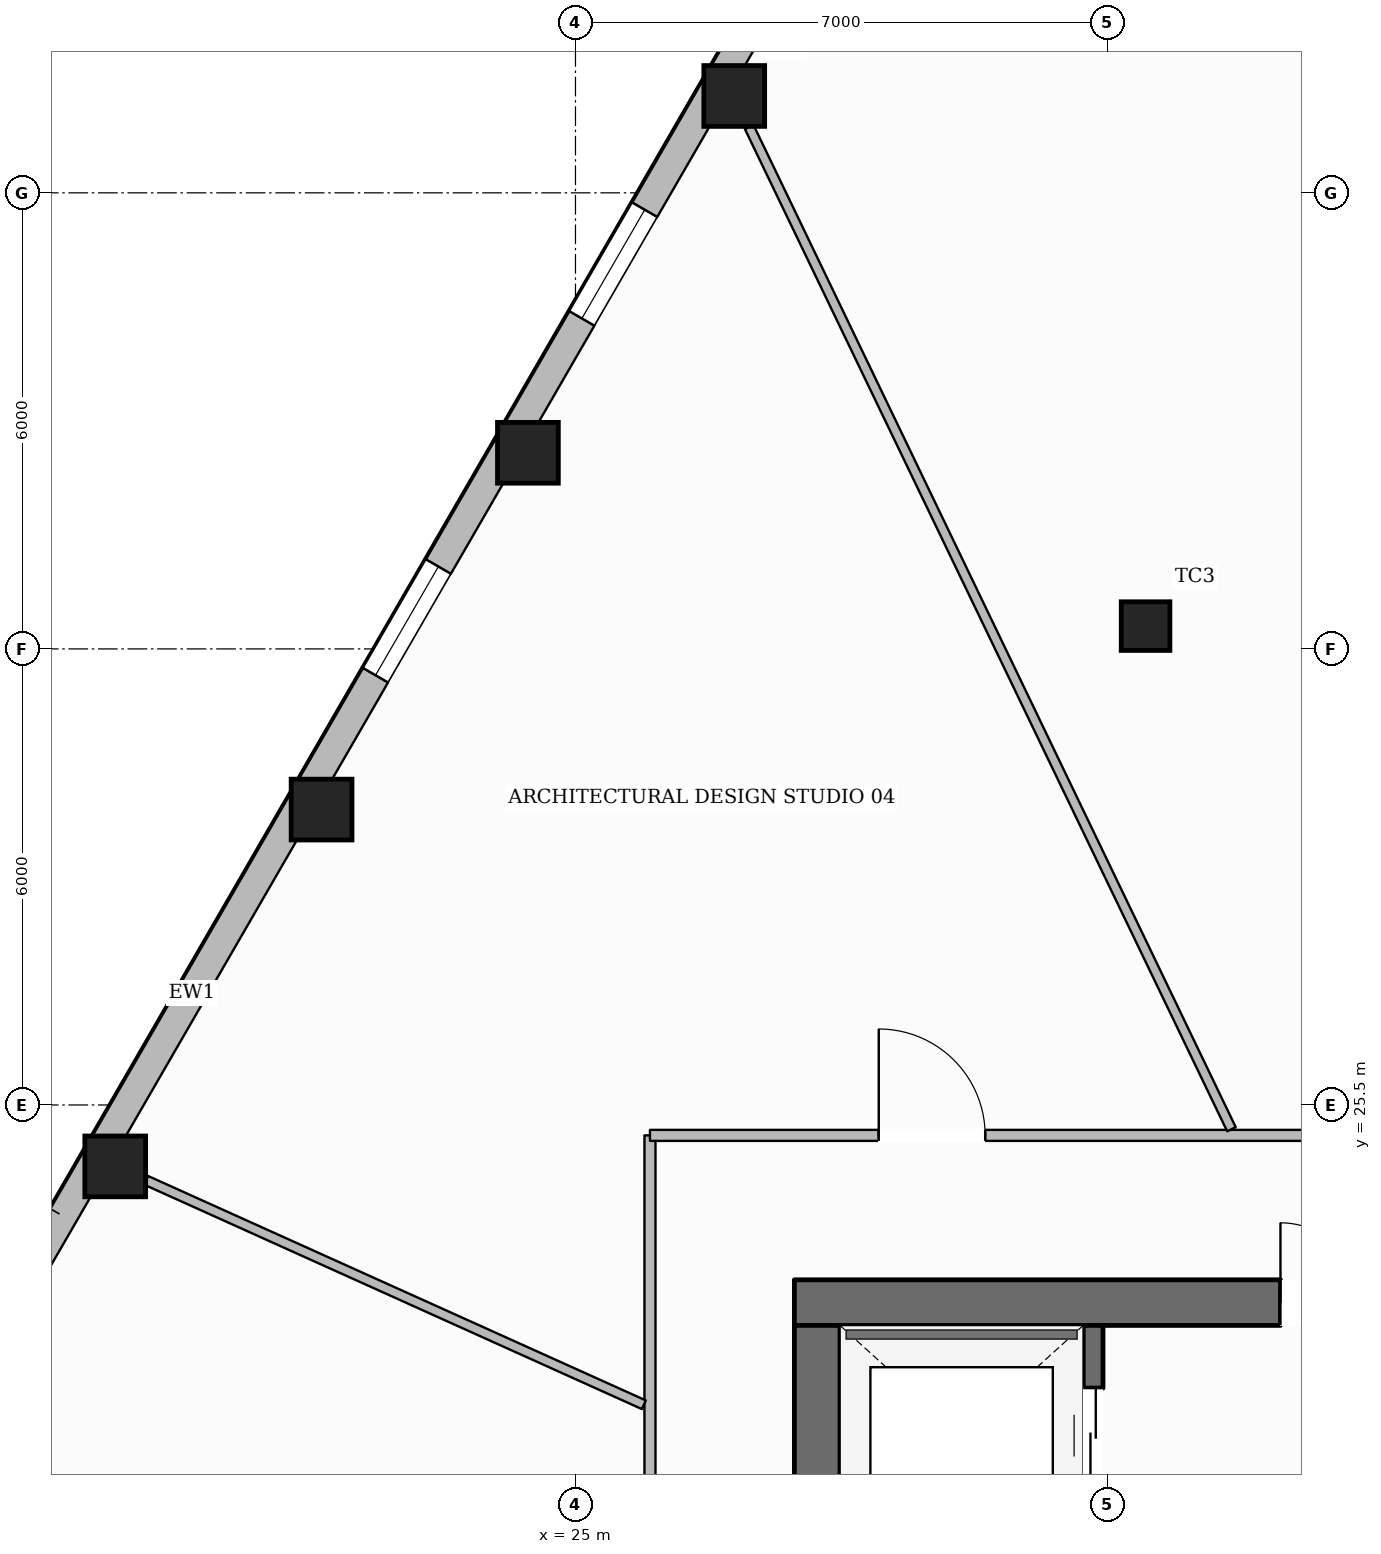
"""IFC4 building model, lengths in metres.
Left out: names, types, materials, properties, quantities, classifications, styles, units other than length and angle.
Written with IfcOpenShell. Run it as: python <this file> out.ifc"""

import sys

from ifc_helpers import new_model, si_unit, direction, frame, frame_2d, origin, origin_2d, place, context, subcontext, project, spatial, rectangle, hollow_rectangle, extrude, element, fill, save


model = new_model("IFC4")
c1 = context("Model", 3, precision=1e-05, world=origin(), true_north=direction((0.0, 1.0)))
c2 = subcontext(c1, "Body", "Model", "MODEL_VIEW")
j1 = project(units=[si_unit("LENGTHUNIT", "METRE"), si_unit("PLANEANGLEUNIT", "RADIAN")], contexts=[c1])
p1 = place(None, origin())
s1 = spatial("IfcSite", under=j1, at=p1, CompositionType="ELEMENT")
p2 = place(p1, origin())
s2 = spatial("IfcBuilding", under=s1, at=p2, CompositionType="ELEMENT")
p3 = place(p2, frame((0.0, 0.0, 9.85)))
s3 = spatial("IfcBuildingStorey", under=s2, at=p3, CompositionType="ELEMENT", Elevation=9.85)
p4 = place(p3, frame((27.88, 22.9, 0.0), z_axis=(0.0, 0.0, 1.0), x_axis=(1.0, 0.0, 0.0)))
e1 = element("IfcWall", 1, at=p4, inside=s3, PredefinedType="SOLIDWALL", context=c2, shape_type="SweptSolid", body=[
    extrude(rectangle(XDim=20.24, YDim=0.6, at=frame_2d((10.12, 0.0))), origin(), (0.0, 0.0, 1.0), 3.59),
])
p5 = place(p4, frame((6.395, 0.0, 0.0)))
e2 = element("IfcOpeningElement", 2, at=p5, cuts=e1, PredefinedType="OPENING", context=c2, shape_type="SweptSolid", body=[
    extrude(rectangle(XDim=1.05, YDim=2.15, at=frame_2d((0.525, 1.075))), frame((0.0, 0.31, 0.0), z_axis=(0.0, -1.0, 0.0), x_axis=(1.0, 0.0, 0.0)), (0.0, 0.0, 1.0), 0.62),
])
p6 = place(p4, frame((12.795, 0.0, 0.0)))
e3 = element("IfcOpeningElement", 3, at=p6, cuts=e1, PredefinedType="OPENING", context=c2, shape_type="SweptSolid", body=[
    extrude(rectangle(XDim=1.05, YDim=2.15, at=frame_2d((0.525, 1.075))), frame((0.0, 0.31, 0.0), z_axis=(0.0, -1.0, 0.0), x_axis=(1.0, 0.0, 0.0)), (0.0, 0.0, 1.0), 0.62),
])
p7 = place(p3, frame((28.18, 9.6, 0.0), z_axis=(0.0, 0.0, 1.0), x_axis=(0.0, 1.0, 0.0)))
e4 = element("IfcWall", 4, at=p7, inside=s3, PredefinedType="SOLIDWALL", context=c2, shape_type="SweptSolid", body=[
    extrude(rectangle(XDim=13.0, YDim=0.6, at=frame_2d((6.5, 0.0))), origin(), (0.0, 0.0, 1.0), 3.59),
])
p8 = place(p7, frame((0.2, 0.0, 0.0)))
e5 = element("IfcOpeningElement", 5, at=p8, cuts=e4, PredefinedType="OPENING", context=c2, shape_type="SweptSolid", body=[
    extrude(rectangle(XDim=1.1, YDim=2.15, at=frame_2d((0.55, 1.075))), frame((0.0, 0.31, 0.0), z_axis=(0.0, -1.0, 0.0), x_axis=(1.0, 0.0, 0.0)), (0.0, 0.0, 1.0), 0.62),
])
p9 = place(p7, frame((8.4, 0.0, 0.0)))
e6 = element("IfcOpeningElement", 6, at=p9, cuts=e4, PredefinedType="OPENING", context=c2, shape_type="SweptSolid", body=[
    extrude(rectangle(XDim=0.9, YDim=2.1, at=frame_2d((0.45, 1.05))), frame((0.0, 0.31, 0.0), z_axis=(0.0, -1.0, 0.0), x_axis=(1.0, 0.0, 0.0)), (0.0, 0.0, 1.0), 0.62),
])
p10 = place(p3, frame((31.81, 9.6, 0.0), z_axis=(0.0, 0.0, 1.0), x_axis=(0.0, 1.0, 0.0)))
e7 = element("IfcWall", 7, at=p10, inside=s3, PredefinedType="SHEAR", context=c2, shape_type="SweptSolid", body=[
    extrude(rectangle(XDim=13.0, YDim=0.26, at=frame_2d((6.5, 0.0))), origin(), (0.0, 0.0, 1.0), 3.59),
])
p11 = place(p10, frame((10.925, 0.0, 0.0)))
e8 = element("IfcOpeningElement", 8, at=p11, cuts=e7, PredefinedType="OPENING", context=c2, shape_type="SweptSolid", body=[
    extrude(rectangle(XDim=1.25, YDim=2.25, at=frame_2d((0.625, 1.125))), frame((0.0, 0.14, 0.0), z_axis=(0.0, -1.0, 0.0), x_axis=(1.0, 0.0, 0.0)), (0.0, 0.0, 1.0), 0.28),
])
for number, where, z_axis, x_axis in (
    (9, (27.089, 38.774, 0.0), (0.0, 0.0, 1.0), (1.0, 0.0, 0.0)),
    (10, (24.374, 34.08, 0.0), (0.0, 0.0, 1.0), (1.0, 0.0, 0.0)),
    (11, (21.659, 29.386, 0.0), (0.0, 0.0, 1.0), (1.0, 0.0, 0.0)),
    (12, (18.945, 24.692, 0.0), (0.0, 0.0, 1.0), (1.0, 0.0, 0.0)),
):
    element("IfcColumn", number, at=place(p3, frame(where, z_axis=z_axis, x_axis=x_axis)), inside=s3, PredefinedType="COLUMN", context=c2, shape_type="SweptSolid", body=[
        extrude(hollow_rectangle(XDim=0.8, YDim=0.8, WallThickness=0.036, at=origin_2d()), origin(), (0.0, 0.0, 1.0), 3.59),
    ])
p12 = place(p3, frame((32.5, 31.8, 0.0), z_axis=(0.0, 0.0, 1.0), x_axis=(1.0, 0.0, 0.0)))
e13 = element("IfcColumn", 13, at=p12, inside=s3, PredefinedType="COLUMN", context=c2, shape_type="SweptSolid", body=[
    extrude(hollow_rectangle(XDim=0.64, YDim=0.64, WallThickness=0.028, at=origin_2d()), origin(), (0.0, 0.0, 1.0), 3.59),
])
p13 = place(p3, frame((13.044, 15.027, 0.0), z_axis=(0.0, 0.0, 1.0), x_axis=(0.500616330433, 0.865669272704, 0.0)))
e14 = element("IfcWall", 14, at=p13, inside=s3, PredefinedType="STANDARD", context=c2, shape_type="SweptSolid", body=[
    extrude(rectangle(XDim=33.487, YDim=0.38, at=frame_2d((16.743, 0.0))), origin(), (0.0, 0.0, 1.0), 2.97),
])
p14 = place(p13, frame((7.972, 0.0, 0.0)))
e15 = element("IfcOpeningElement", 15, at=p14, cuts=e14, PredefinedType="OPENING", context=c2, shape_type="SweptSolid", body=[
    extrude(rectangle(XDim=1.0, YDim=2.2, at=frame_2d((0.5, 1.1))), frame((0.0, 0.2, 0.0), z_axis=(0.0, -1.0, 0.0), x_axis=(1.0, 0.0, 0.0)), (0.0, 0.0, 1.0), 0.4),
])
p15 = place(p13, frame((29.475, 0.0, 0.65)))
e16 = element("IfcOpeningElement", 16, at=p15, cuts=e14, PredefinedType="OPENING", context=c2, shape_type="SweptSolid", body=[
    extrude(rectangle(XDim=1.65, YDim=1.75, at=frame_2d((0.825, 0.875))), frame((0.0, 0.2, 0.0), z_axis=(0.0, -1.0, 0.0), x_axis=(1.0, 0.0, 0.0)), (0.0, 0.0, 1.0), 0.4),
])
p16 = place(p13, frame((24.052, 0.0, 0.65)))
e17 = element("IfcOpeningElement", 17, at=p16, cuts=e14, PredefinedType="OPENING", context=c2, shape_type="SweptSolid", body=[
    extrude(rectangle(XDim=1.65, YDim=1.75, at=frame_2d((0.825, 0.875))), frame((0.0, 0.2, 0.0), z_axis=(0.0, -1.0, 0.0), x_axis=(1.0, 0.0, 0.0)), (0.0, 0.0, 1.0), 0.4),
])
p17 = place(p13, frame((18.63, 0.0, 0.65)))
e18 = element("IfcOpeningElement", 18, at=p17, cuts=e14, PredefinedType="OPENING", context=c2, shape_type="SweptSolid", body=[
    extrude(rectangle(XDim=1.65, YDim=1.75, at=frame_2d((0.825, 0.875))), frame((0.0, 0.2, 0.0), z_axis=(0.0, -1.0, 0.0), x_axis=(1.0, 0.0, 0.0)), (0.0, 0.0, 1.0), 0.4),
])
p18 = place(p13, frame((2.362, 0.0, 0.65)))
e19 = element("IfcOpeningElement", 19, at=p18, cuts=e14, PredefinedType="OPENING", context=c2, shape_type="SweptSolid", body=[
    extrude(rectangle(XDim=1.65, YDim=1.75, at=frame_2d((0.825, 0.875))), frame((0.0, 0.2, 0.0), z_axis=(0.0, -1.0, 0.0), x_axis=(1.0, 0.0, 0.0)), (0.0, 0.0, 1.0), 0.4),
])
p19 = place(p3, frame((25.98, 9.1, 0.0), z_axis=(0.0, 0.0, 1.0), x_axis=(0.0, 1.0, 0.0)))
e20 = element("IfcWall", 20, at=p19, inside=s3, PredefinedType="PARTITIONING", context=c2, shape_type="SweptSolid", body=[
    extrude(rectangle(XDim=16.0, YDim=0.145, at=frame_2d((8.0, 0.0))), origin(), (0.0, 0.0, 1.0), 3.278),
])
p20 = place(p19, frame((5.811, 0.0, 0.0)))
e21 = element("IfcOpeningElement", 21, at=p20, cuts=e20, PredefinedType="OPENING", context=c2, shape_type="SweptSolid", body=[
    extrude(rectangle(XDim=1.4, YDim=2.2, at=frame_2d((0.7, 1.1))), frame((0.0, 0.083, 0.0), z_axis=(0.0, -1.0, 0.0), x_axis=(1.0, 0.0, 0.0)), (0.0, 0.0, 1.0), 0.165),
])
p21 = place(p3, frame((25.98, 25.1, 0.0), z_axis=(0.0, 0.0, 1.0), x_axis=(1.0, 0.0, 0.0)))
e22 = element("IfcWall", 22, at=p21, inside=s3, PredefinedType="PARTITIONING", context=c2, shape_type="SweptSolid", body=[
    extrude(rectangle(XDim=11.02, YDim=0.145, at=frame_2d((5.51, 0.0))), origin(), (0.0, 0.0, 1.0), 3.59),
])
p22 = place(p21, frame((3.01, 0.0, 0.0)))
e23 = element("IfcOpeningElement", 23, at=p22, cuts=e22, PredefinedType="OPENING", context=c2, shape_type="SweptSolid", body=[
    extrude(rectangle(XDim=1.4, YDim=2.2, at=frame_2d((0.7, 1.1))), frame((0.0, 0.083, 0.0), z_axis=(0.0, -1.0, 0.0), x_axis=(1.0, 0.0, 0.0)), (0.0, 0.0, 1.0), 0.165),
])
p23 = place(p3, frame((33.63, 25.18, 0.0), z_axis=(0.0, 0.0, 1.0), x_axis=(-0.433614955138, 0.901098258061, 0.0)))
e24 = element("IfcWall", 24, at=p23, inside=s3, PredefinedType="PARTITIONING", context=c2, shape_type="SweptSolid", body=[
    extrude(rectangle(XDim=14.633, YDim=0.125, at=frame_2d((7.317, 0.0))), origin(), (0.0, 0.0, 1.0), 3.057),
])
p24 = place(p3, frame((25.899, 21.556, 0.0), z_axis=(0.0, 0.0, 1.0), x_axis=(-0.911612735683, 0.411050143097, 0.0)))
e25 = element("IfcWall", 25, at=p24, inside=s3, PredefinedType="PARTITIONING", context=c2, shape_type="SweptSolid", body=[
    extrude(rectangle(XDim=7.181, YDim=0.125, at=frame_2d((3.591, 0.0))), origin(), (0.0, 0.0, 1.0), 3.057),
])
p25 = place(p16, origin())
e26 = element("IfcWindow", 26, at=p25, inside=s3, PartitioningType="SINGLE_PANEL", PredefinedType="WINDOW", context=c2, shape_type="SweptSolid", body=[
    extrude(rectangle(XDim=1.65, YDim=1.75, at=frame_2d((0.825, 0.875))), frame((0.0, 0.03, 0.0), z_axis=(0.0, -1.0, 0.0), x_axis=(1.0, 0.0, 0.0)), (0.0, 0.0, 1.0), 0.06),
])
fill(e17, e26)
p26 = place(p17, origin())
e27 = element("IfcWindow", 27, at=p26, inside=s3, PartitioningType="SINGLE_PANEL", PredefinedType="WINDOW", context=c2, shape_type="SweptSolid", body=[
    extrude(rectangle(XDim=1.65, YDim=1.75, at=frame_2d((0.825, 0.875))), frame((0.0, 0.03, 0.0), z_axis=(0.0, -1.0, 0.0), x_axis=(1.0, 0.0, 0.0)), (0.0, 0.0, 1.0), 0.06),
])
fill(e18, e27)
p27 = place(p5, origin())
e28 = element("IfcDoor", 28, at=p27, inside=s3, OperationType="SINGLE_SWING_LEFT", PredefinedType="DOOR", context=c2, shape_type="SweptSolid", body=[
    extrude(rectangle(XDim=1.05, YDim=2.15, at=frame_2d((0.525, 1.075))), frame((0.0, 0.025, 0.0), z_axis=(0.0, -1.0, 0.0), x_axis=(1.0, 0.0, 0.0)), (0.0, 0.0, 1.0), 0.05),
])
fill(e2, e28)
p28 = place(p11, origin())
e29 = element("IfcDoor", 29, at=p28, inside=s3, OperationType="DOUBLE_DOOR_SLIDING", PredefinedType="DOOR", context=c2, shape_type="SweptSolid", body=[
    extrude(rectangle(XDim=1.25, YDim=2.25, at=frame_2d((0.625, 1.125))), frame((0.0, 0.025, 0.0), z_axis=(0.0, -1.0, 0.0), x_axis=(1.0, 0.0, 0.0)), (0.0, 0.0, 1.0), 0.05),
])
fill(e8, e29)
p29 = place(p22, origin())
e30 = element("IfcDoor", 30, at=p29, inside=s3, OperationType="SINGLE_SWING_LEFT", PredefinedType="DOOR", context=c2, shape_type="SweptSolid", body=[
    extrude(rectangle(XDim=1.4, YDim=2.2, at=frame_2d((0.7, 1.1))), frame((0.0, 0.025, 0.0), z_axis=(0.0, -1.0, 0.0), x_axis=(1.0, 0.0, 0.0)), (0.0, 0.0, 1.0), 0.05),
])
fill(e23, e30)
save(model, sys.argv[1])
